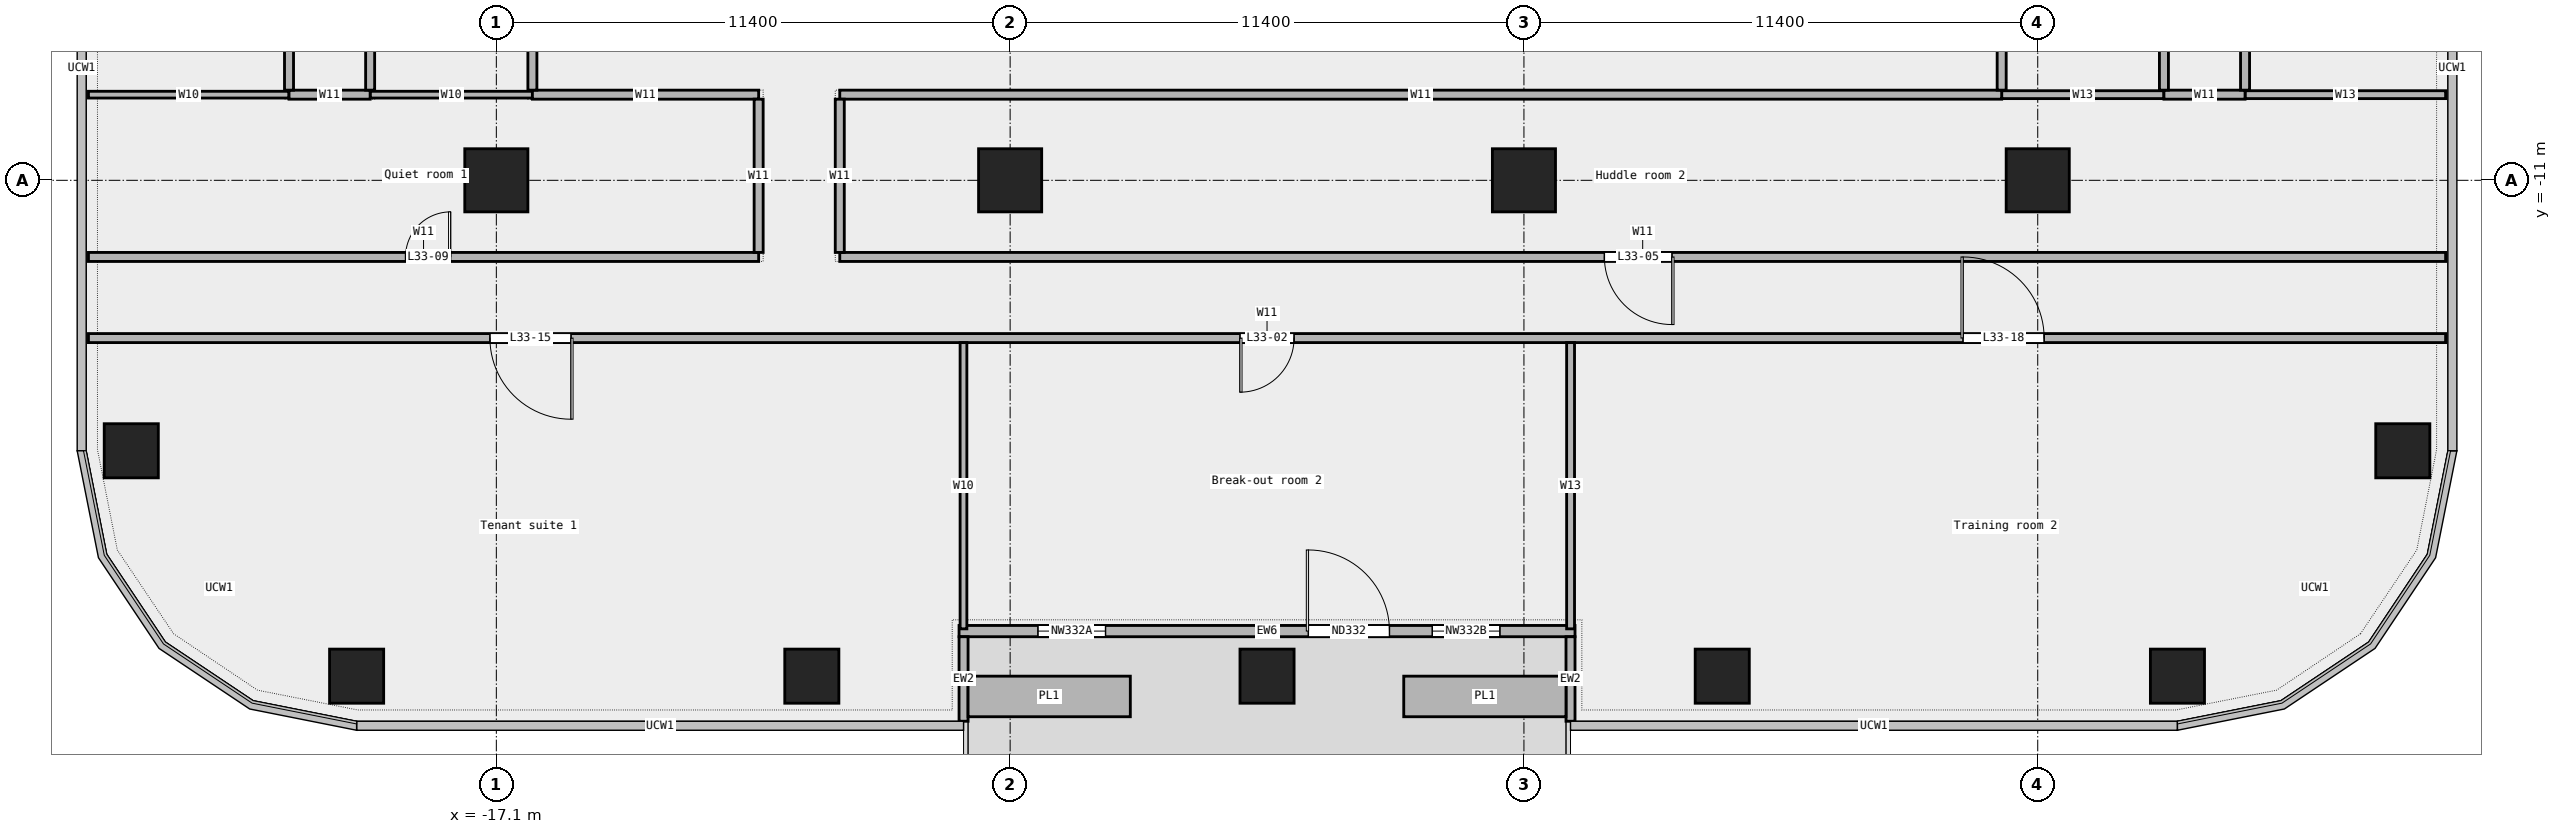
"""IFC4 building model, lengths in metres.
Left out: names, types, materials, properties, quantities, classifications, styles, units other than length and angle.
Written with IfcOpenShell. Run it as: python <this file> out.ifc"""

import sys

from ifc_helpers import new_model, si_unit, direction, frame, frame_2d, origin, origin_2d, place, context, subcontext, project, spatial, rectangle, extrude, element, fill, save


model = new_model("IFC4")
c1 = context("Model", 3, precision=1e-05, world=origin(), true_north=direction((0.0, 1.0)))
c2 = subcontext(c1, "Body", "Model", "MODEL_VIEW")
j1 = project(units=[si_unit("LENGTHUNIT", "METRE"), si_unit("PLANEANGLEUNIT", "RADIAN")], contexts=[c1])
p1 = place(None, origin())
s1 = spatial("IfcSite", under=j1, at=p1, CompositionType="ELEMENT")
p2 = place(p1, origin())
s2 = spatial("IfcBuilding", under=s1, at=p2, CompositionType="ELEMENT")
p3 = place(p2, frame((0.0, 0.0, 165.0)))
s3 = spatial("IfcBuildingStorey", under=s2, at=p3, CompositionType="ELEMENT", Elevation=165.0)
for number, where, z_axis, x_axis in (
    (1, (-20.2, -22.0, 0.0), (0.0, 0.0, 1.0), (1.0, 0.0, 0.0)),
    (2, (-10.1, -22.0, 0.0), (0.0, 0.0, 1.0), (1.0, 0.0, 0.0)),
    (3, (0.0, -22.0, 0.0), (0.0, 0.0, 1.0), (1.0, 0.0, 0.0)),
    (4, (10.1, -22.0, 0.0), (0.0, 0.0, 1.0), (1.0, 0.0, 0.0)),
    (5, (20.2, -22.0, 0.0), (0.0, 0.0, 1.0), (1.0, 0.0, 0.0)),
    (6, (25.2, -17.0, 0.0), (0.0, 0.0, 1.0), (1.0, 0.0, 0.0)),
    (7, (-25.2, -17.0, 0.0), (0.0, 0.0, 1.0), (1.0, 0.0, 0.0)),
):
    element("IfcColumn", number, at=place(p3, frame(where, z_axis=z_axis, x_axis=x_axis)), inside=s3, PredefinedType="COLUMN", context=c2, shape_type="SweptSolid", body=[
        extrude(rectangle(XDim=1.2, YDim=1.2, at=origin_2d()), origin(), (0.0, 0.0, 1.0), 3.6),
    ])
for number, where, z_axis, x_axis in (
    (8, (-17.1, -11.0, 0.0), (0.0, 0.0, 1.0), (1.0, 0.0, 0.0)),
    (9, (-5.7, -11.0, 0.0), (0.0, 0.0, 1.0), (1.0, 0.0, 0.0)),
    (10, (5.7, -11.0, 0.0), (0.0, 0.0, 1.0), (1.0, 0.0, 0.0)),
    (11, (17.1, -11.0, 0.0), (0.0, 0.0, 1.0), (1.0, 0.0, 0.0)),
):
    element("IfcColumn", number, at=place(p3, frame(where, z_axis=z_axis, x_axis=x_axis)), inside=s3, PredefinedType="COLUMN", context=c2, shape_type="SweptSolid", body=[
        extrude(rectangle(XDim=1.4, YDim=1.4, at=origin_2d()), origin(), (0.0, 0.0, 1.0), 3.6),
    ])
p4 = place(p3, frame((-6.833, -21.0, 0.0), z_axis=(0.0, 0.0, 1.0), x_axis=(1.0, 0.0, 0.0)))
e12 = element("IfcWall", 12, at=p4, inside=s3, PredefinedType="STANDARD", context=c2, shape_type="SweptSolid", body=[
    extrude(rectangle(XDim=13.667, YDim=0.25, at=frame_2d((6.833, 0.0))), origin(), (0.0, 0.0, 1.0), 3.6),
])
p5 = place(p4, frame((1.75, 0.0, 0.45)))
e13 = element("IfcOpeningElement", 13, at=p5, cuts=e12, PredefinedType="OPENING", context=c2, shape_type="SweptSolid", body=[
    extrude(rectangle(XDim=1.5, YDim=2.4, at=frame_2d((0.75, 1.2))), frame((0.0, 0.137, 0.0), z_axis=(0.0, -1.0, 0.0), x_axis=(1.0, 0.0, 0.0)), (0.0, 0.0, 1.0), 0.274),
])
p6 = place(p4, frame((7.75, 0.0, 0.0)))
e14 = element("IfcOpeningElement", 14, at=p6, cuts=e12, PredefinedType="OPENING", context=c2, shape_type="SweptSolid", body=[
    extrude(rectangle(XDim=1.8, YDim=2.4, at=frame_2d((0.9, 1.2))), frame((0.0, 0.137, 0.0), z_axis=(0.0, -1.0, 0.0), x_axis=(1.0, 0.0, 0.0)), (0.0, 0.0, 1.0), 0.274),
])
p7 = place(p4, frame((10.5, 0.0, 0.45)))
e15 = element("IfcOpeningElement", 15, at=p7, cuts=e12, PredefinedType="OPENING", context=c2, shape_type="SweptSolid", body=[
    extrude(rectangle(XDim=1.5, YDim=2.4, at=frame_2d((0.75, 1.2))), frame((0.0, 0.137, 0.0), z_axis=(0.0, -1.0, 0.0), x_axis=(1.0, 0.0, 0.0)), (0.0, 0.0, 1.0), 0.274),
])
for number, where, z_axis, x_axis in (
    (16, (-6.733, -23.0, 0.0), (0.0, 0.0, 1.0), (0.0, 1.0, 0.0)),
    (17, (6.733, -23.0, 0.0), (0.0, 0.0, 1.0), (0.0, 1.0, 0.0)),
):
    element("IfcWall", number, at=place(p3, frame(where, z_axis=z_axis, x_axis=x_axis)), inside=s3, PredefinedType="STANDARD", context=c2, shape_type="SweptSolid", body=[
        extrude(rectangle(XDim=1.875, YDim=0.2, at=frame_2d((0.938, 0.0))), origin(), (0.0, 0.0, 1.0), 3.6),
    ])
for number, where, z_axis, x_axis in (
    (18, (-6.633, -22.45, 0.0), (0.0, 0.0, 1.0), (1.0, 0.0, 0.0)),
    (19, (3.033, -22.45, 0.0), (0.0, 0.0, 1.0), (1.0, 0.0, 0.0)),
):
    element("IfcWall", number, at=place(p3, frame(where, z_axis=z_axis, x_axis=x_axis)), inside=s3, PredefinedType="STANDARD", context=c2, shape_type="SweptSolid", body=[
        extrude(rectangle(XDim=3.6, YDim=0.9, at=frame_2d((1.8, 0.0))), origin(), (0.0, 0.0, 1.0), 0.7),
    ])
p8 = place(p3, frame((-26.15, -14.5, 0.0), z_axis=(0.0, 0.0, 1.0), x_axis=(1.0, 0.0, 0.0)))
e20 = element("IfcWall", 20, at=p8, inside=s3, PredefinedType="PARTITIONING", context=c2, shape_type="SweptSolid", body=[
    extrude(rectangle(XDim=52.3, YDim=0.2, at=frame_2d((26.15, 0.0))), origin(), (0.0, 0.0, 1.0), 3.6),
])
p9 = place(p8, frame((25.55, 0.0, 0.0)))
e21 = element("IfcOpeningElement", 21, at=p9, cuts=e20, PredefinedType="OPENING", context=c2, shape_type="SweptSolid", body=[
    extrude(rectangle(XDim=1.2, YDim=2.1, at=frame_2d((0.6, 1.05))), frame((0.0, 0.112, 0.0), z_axis=(0.0, -1.0, 0.0), x_axis=(1.0, 0.0, 0.0)), (0.0, 0.0, 1.0), 0.224),
])
p10 = place(p8, frame((8.907, 0.0, 0.0)))
e22 = element("IfcOpeningElement", 22, at=p10, cuts=e20, PredefinedType="OPENING", context=c2, shape_type="SweptSolid", body=[
    extrude(rectangle(XDim=1.8, YDim=2.1, at=frame_2d((0.9, 1.05))), frame((0.0, 0.112, 0.0), z_axis=(0.0, -1.0, 0.0), x_axis=(1.0, 0.0, 0.0)), (0.0, 0.0, 1.0), 0.224),
])
p11 = place(p8, frame((41.593, 0.0, 0.0)))
e23 = element("IfcOpeningElement", 23, at=p11, cuts=e20, PredefinedType="OPENING", context=c2, shape_type="SweptSolid", body=[
    extrude(rectangle(XDim=1.8, YDim=2.1, at=frame_2d((0.9, 1.05))), frame((0.0, 0.112, 0.0), z_axis=(0.0, -1.0, 0.0), x_axis=(1.0, 0.0, 0.0)), (0.0, 0.0, 1.0), 0.224),
])
p12 = place(p3, frame((-26.15, -12.7, 0.0), z_axis=(0.0, 0.0, 1.0), x_axis=(1.0, 0.0, 0.0)))
e24 = element("IfcWall", 24, at=p12, inside=s3, PredefinedType="PARTITIONING", context=c2, shape_type="SweptSolid", body=[
    extrude(rectangle(XDim=14.87, YDim=0.2, at=frame_2d((7.435, 0.0))), origin(), (0.0, 0.0, 1.0), 3.6),
])
p13 = place(p12, frame((7.035, 0.0, 0.0)))
e25 = element("IfcOpeningElement", 25, at=p13, cuts=e24, PredefinedType="OPENING", context=c2, shape_type="SweptSolid", body=[
    extrude(rectangle(XDim=1.0, YDim=2.1, at=frame_2d((0.5, 1.05))), frame((0.0, 0.112, 0.0), z_axis=(0.0, -1.0, 0.0), x_axis=(1.0, 0.0, 0.0)), (0.0, 0.0, 1.0), 0.224),
])
p14 = place(p3, frame((-9.48, -12.7, 0.0), z_axis=(0.0, 0.0, 1.0), x_axis=(1.0, 0.0, 0.0)))
e26 = element("IfcWall", 26, at=p14, inside=s3, PredefinedType="PARTITIONING", context=c2, shape_type="SweptSolid", body=[
    extrude(rectangle(XDim=35.63, YDim=0.2, at=frame_2d((17.815, 0.0))), origin(), (0.0, 0.0, 1.0), 3.6),
])
p15 = place(p14, frame((16.965, 0.0, 0.0)))
e27 = element("IfcOpeningElement", 27, at=p15, cuts=e26, PredefinedType="OPENING", context=c2, shape_type="SweptSolid", body=[
    extrude(rectangle(XDim=1.5, YDim=2.1, at=frame_2d((0.75, 1.05))), frame((0.0, 0.112, 0.0), z_axis=(0.0, -1.0, 0.0), x_axis=(1.0, 0.0, 0.0)), (0.0, 0.0, 1.0), 0.224),
])
p16 = place(p3, frame((-26.15, -9.1, 0.0), z_axis=(0.0, 0.0, 1.0), x_axis=(1.0, 0.0, 0.0)))
e28 = element("IfcWall", 28, at=p16, inside=s3, PredefinedType="PARTITIONING", context=c2, shape_type="SweptSolid", body=[
    extrude(rectangle(XDim=4.45, YDim=0.15, at=frame_2d((2.225, 0.0))), origin(), (0.0, 0.0, 1.0), 3.6),
])
p17 = place(p3, frame((-19.9, -9.1, 0.0), z_axis=(0.0, 0.0, 1.0), x_axis=(1.0, 0.0, 0.0)))
e29 = element("IfcWall", 29, at=p17, inside=s3, PredefinedType="PARTITIONING", context=c2, shape_type="SweptSolid", body=[
    extrude(rectangle(XDim=3.6, YDim=0.15, at=frame_2d((1.8, 0.0))), origin(), (0.0, 0.0, 1.0), 3.6),
])
p18 = place(p3, frame((16.3, -9.1, 0.0), z_axis=(0.0, 0.0, 1.0), x_axis=(1.0, 0.0, 0.0)))
e30 = element("IfcWall", 30, at=p18, inside=s3, PredefinedType="PARTITIONING", context=c2, shape_type="SweptSolid", body=[
    extrude(rectangle(XDim=3.6, YDim=0.175, at=frame_2d((1.8, 0.0))), origin(), (0.0, 0.0, 1.0), 3.6),
])
p19 = place(p3, frame((21.7, -9.1, 0.0), z_axis=(0.0, 0.0, 1.0), x_axis=(1.0, 0.0, 0.0)))
e31 = element("IfcWall", 31, at=p19, inside=s3, PredefinedType="PARTITIONING", context=c2, shape_type="SweptSolid", body=[
    extrude(rectangle(XDim=4.45, YDim=0.175, at=frame_2d((2.225, 0.0))), origin(), (0.0, 0.0, 1.0), 3.6),
])
p20 = place(p3, frame((-21.7, -9.1, 0.0), z_axis=(0.0, 0.0, 1.0), x_axis=(1.0, 0.0, 0.0)))
e32 = element("IfcWall", 32, at=p20, inside=s3, PredefinedType="PARTITIONING", context=c2, shape_type="SweptSolid", body=[
    extrude(rectangle(XDim=1.8, YDim=0.2, at=frame_2d((0.9, 0.0))), origin(), (0.0, 0.0, 1.0), 3.6),
])
p21 = place(p3, frame((-16.3, -9.1, 0.0), z_axis=(0.0, 0.0, 1.0), x_axis=(1.0, 0.0, 0.0)))
e33 = element("IfcWall", 33, at=p21, inside=s3, PredefinedType="PARTITIONING", context=c2, shape_type="SweptSolid", body=[
    extrude(rectangle(XDim=5.02, YDim=0.2, at=frame_2d((2.51, 0.0))), origin(), (0.0, 0.0, 1.0), 3.6),
])
p22 = place(p3, frame((-9.48, -9.1, 0.0), z_axis=(0.0, 0.0, 1.0), x_axis=(1.0, 0.0, 0.0)))
e34 = element("IfcWall", 34, at=p22, inside=s3, PredefinedType="PARTITIONING", context=c2, shape_type="SweptSolid", body=[
    extrude(rectangle(XDim=25.78, YDim=0.2, at=frame_2d((12.89, 0.0))), origin(), (0.0, 0.0, 1.0), 3.6),
])
p23 = place(p3, frame((19.9, -9.1, 0.0), z_axis=(0.0, 0.0, 1.0), x_axis=(1.0, 0.0, 0.0)))
e35 = element("IfcWall", 35, at=p23, inside=s3, PredefinedType="PARTITIONING", context=c2, shape_type="SweptSolid", body=[
    extrude(rectangle(XDim=1.8, YDim=0.2, at=frame_2d((0.9, 0.0))), origin(), (0.0, 0.0, 1.0), 3.6),
])
p24 = place(p3, frame((-21.7, -9.0, 0.0), z_axis=(0.0, 0.0, 1.0), x_axis=(0.0, 1.0, 0.0)))
e36 = element("IfcWall", 36, at=p24, inside=s3, PredefinedType="PARTITIONING", context=c2, shape_type="SweptSolid", body=[
    extrude(rectangle(XDim=24.3, YDim=0.2, at=frame_2d((12.15, 0.0))), origin(), (0.0, 0.0, 1.0), 3.6),
])
p25 = place(p24, frame((14.925, 0.0, 0.0)))
e37 = element("IfcOpeningElement", 37, at=p25, cuts=e36, PredefinedType="OPENING", context=c2, shape_type="SweptSolid", body=[
    extrude(rectangle(XDim=0.9, YDim=2.1, at=frame_2d((0.45, 1.05))), frame((0.0, 0.112, 0.0), z_axis=(0.0, -1.0, 0.0), x_axis=(1.0, 0.0, 0.0)), (0.0, 0.0, 1.0), 0.224),
])
p26 = place(p24, frame((4.05, 0.0, 0.0)))
e38 = element("IfcOpeningElement", 38, at=p26, cuts=e36, PredefinedType="OPENING", context=c2, shape_type="SweptSolid", body=[
    extrude(rectangle(XDim=0.9, YDim=2.1, at=frame_2d((0.45, 1.05))), frame((0.0, 0.112, 0.0), z_axis=(0.0, -1.0, 0.0), x_axis=(1.0, 0.0, 0.0)), (0.0, 0.0, 1.0), 0.224),
])
p27 = place(p3, frame((-19.9, -9.0, 0.0), z_axis=(0.0, 0.0, 1.0), x_axis=(0.0, 1.0, 0.0)))
e39 = element("IfcWall", 39, at=p27, inside=s3, PredefinedType="PARTITIONING", context=c2, shape_type="SweptSolid", body=[
    extrude(rectangle(XDim=11.15, YDim=0.2, at=frame_2d((5.575, 0.0))), origin(), (0.0, 0.0, 1.0), 3.6),
])
p28 = place(p3, frame((-16.3, -9.0, 0.0), z_axis=(0.0, 0.0, 1.0), x_axis=(0.0, 1.0, 0.0)))
e40 = element("IfcWall", 40, at=p28, inside=s3, PredefinedType="PARTITIONING", context=c2, shape_type="SweptSolid", body=[
    extrude(rectangle(XDim=8.3, YDim=0.2, at=frame_2d((4.15, 0.0))), origin(), (0.0, 0.0, 1.0), 3.6),
])
p29 = place(p28, frame((6.823, 0.0, 0.0)))
e41 = element("IfcOpeningElement", 41, at=p29, cuts=e40, PredefinedType="OPENING", context=c2, shape_type="SweptSolid", body=[
    extrude(rectangle(XDim=0.9, YDim=2.1, at=frame_2d((0.45, 1.05))), frame((0.0, 0.112, 0.0), z_axis=(0.0, -1.0, 0.0), x_axis=(1.0, 0.0, 0.0)), (0.0, 0.0, 1.0), 0.224),
])
p30 = place(p28, frame((2.673, 0.0, 0.0)))
e42 = element("IfcOpeningElement", 42, at=p30, cuts=e40, PredefinedType="OPENING", context=c2, shape_type="SweptSolid", body=[
    extrude(rectangle(XDim=0.9, YDim=2.1, at=frame_2d((0.45, 1.05))), frame((0.0, 0.112, 0.0), z_axis=(0.0, -1.0, 0.0), x_axis=(1.0, 0.0, 0.0)), (0.0, 0.0, 1.0), 0.224),
])
for number, where, z_axis, x_axis in (
    (43, (-11.28, -12.6, 0.0), (0.0, 0.0, 1.0), (0.0, 1.0, 0.0)),
    (44, (-9.48, -12.6, 0.0), (0.0, 0.0, 1.0), (0.0, 1.0, 0.0)),
):
    element("IfcWall", number, at=place(p3, frame(where, z_axis=z_axis, x_axis=x_axis)), inside=s3, PredefinedType="PARTITIONING", context=c2, shape_type="SweptSolid", body=[
        extrude(rectangle(XDim=3.4, YDim=0.2, at=frame_2d((1.7, 0.0))), origin(), (0.0, 0.0, 1.0), 3.6),
    ])
p31 = place(p3, frame((-6.735, -20.95, 0.0), z_axis=(0.0, 0.0, 1.0), x_axis=(0.0, 1.0, 0.0)))
e45 = element("IfcWall", 45, at=p31, inside=s3, PredefinedType="PARTITIONING", context=c2, shape_type="SweptSolid", body=[
    extrude(rectangle(XDim=6.35, YDim=0.15, at=frame_2d((3.175, 0.0))), origin(), (0.0, 0.0, 1.0), 3.6),
])
p32 = place(p3, frame((6.735, -20.95, 0.0), z_axis=(0.0, 0.0, 1.0), x_axis=(0.0, 1.0, 0.0)))
e46 = element("IfcWall", 46, at=p32, inside=s3, PredefinedType="PARTITIONING", context=c2, shape_type="SweptSolid", body=[
    extrude(rectangle(XDim=6.35, YDim=0.175, at=frame_2d((3.175, 0.0))), origin(), (0.0, 0.0, 1.0), 3.6),
])
p33 = place(p3, frame((16.3, -9.0, 0.0), z_axis=(0.0, 0.0, 1.0), x_axis=(0.0, 1.0, 0.0)))
e47 = element("IfcWall", 47, at=p33, inside=s3, PredefinedType="PARTITIONING", context=c2, shape_type="SweptSolid", body=[
    extrude(rectangle(XDim=8.3, YDim=0.2, at=frame_2d((4.15, 0.0))), origin(), (0.0, 0.0, 1.0), 3.6),
])
p34 = place(p3, frame((19.9, -9.0, 0.0), z_axis=(0.0, 0.0, 1.0), x_axis=(0.0, 1.0, 0.0)))
e48 = element("IfcWall", 48, at=p34, inside=s3, PredefinedType="PARTITIONING", context=c2, shape_type="SweptSolid", body=[
    extrude(rectangle(XDim=13.6, YDim=0.2, at=frame_2d((6.8, 0.0))), origin(), (0.0, 0.0, 1.0), 3.6),
])
p35 = place(p34, frame((3.442, 0.0, 0.0)))
e49 = element("IfcOpeningElement", 49, at=p35, cuts=e48, PredefinedType="OPENING", context=c2, shape_type="SweptSolid", body=[
    extrude(rectangle(XDim=0.9, YDim=2.1, at=frame_2d((0.45, 1.05))), frame((0.0, 0.112, 0.0), z_axis=(0.0, -1.0, 0.0), x_axis=(1.0, 0.0, 0.0)), (0.0, 0.0, 1.0), 0.224),
])
p36 = place(p34, frame((10.242, 0.0, 0.0)))
e50 = element("IfcOpeningElement", 50, at=p36, cuts=e48, PredefinedType="OPENING", context=c2, shape_type="SweptSolid", body=[
    extrude(rectangle(XDim=0.9, YDim=2.1, at=frame_2d((0.45, 1.05))), frame((0.0, 0.112, 0.0), z_axis=(0.0, -1.0, 0.0), x_axis=(1.0, 0.0, 0.0)), (0.0, 0.0, 1.0), 0.224),
])
p37 = place(p3, frame((21.7, -9.0, 0.0), z_axis=(0.0, 0.0, 1.0), x_axis=(0.0, 1.0, 0.0)))
e51 = element("IfcWall", 51, at=p37, inside=s3, PredefinedType="PARTITIONING", context=c2, shape_type="SweptSolid", body=[
    extrude(rectangle(XDim=24.3, YDim=0.2, at=frame_2d((12.15, 0.0))), origin(), (0.0, 0.0, 1.0), 3.6),
])
p38 = place(p37, frame((14.925, 0.0, 0.0)))
e52 = element("IfcOpeningElement", 52, at=p38, cuts=e51, PredefinedType="OPENING", context=c2, shape_type="SweptSolid", body=[
    extrude(rectangle(XDim=0.9, YDim=2.1, at=frame_2d((0.45, 1.05))), frame((0.0, 0.112, 0.0), z_axis=(0.0, -1.0, 0.0), x_axis=(1.0, 0.0, 0.0)), (0.0, 0.0, 1.0), 0.224),
])
p39 = place(p37, frame((2.562, 0.0, 0.0)))
e53 = element("IfcOpeningElement", 53, at=p39, cuts=e51, PredefinedType="OPENING", context=c2, shape_type="SweptSolid", body=[
    extrude(rectangle(XDim=0.9, YDim=2.1, at=frame_2d((0.45, 1.05))), frame((0.0, 0.112, 0.0), z_axis=(0.0, -1.0, 0.0), x_axis=(1.0, 0.0, 0.0)), (0.0, 0.0, 1.0), 0.224),
])
p40 = place(p5, origin())
e54 = element("IfcWindow", 54, at=p40, inside=s3, PartitioningType="SINGLE_PANEL", PredefinedType="WINDOW", context=c2, shape_type="SweptSolid", body=[
    extrude(rectangle(XDim=1.5, YDim=2.4, at=frame_2d((0.75, 1.2))), frame((0.0, 0.03, 0.0), z_axis=(0.0, -1.0, 0.0), x_axis=(1.0, 0.0, 0.0)), (0.0, 0.0, 1.0), 0.06),
])
fill(e13, e54)
p41 = place(p6, origin())
e55 = element("IfcDoor", 55, at=p41, inside=s3, OperationType="DOUBLE_DOOR_SINGLE_SWING", PredefinedType="DOOR", context=c2, shape_type="SweptSolid", body=[
    extrude(rectangle(XDim=1.8, YDim=2.4, at=frame_2d((0.9, 1.2))), frame((0.0, 0.025, 0.0), z_axis=(0.0, -1.0, 0.0), x_axis=(1.0, 0.0, 0.0)), (0.0, 0.0, 1.0), 0.05),
])
fill(e14, e55)
p42 = place(p7, origin())
e56 = element("IfcWindow", 56, at=p42, inside=s3, PartitioningType="SINGLE_PANEL", PredefinedType="WINDOW", context=c2, shape_type="SweptSolid", body=[
    extrude(rectangle(XDim=1.5, YDim=2.4, at=frame_2d((0.75, 1.2))), frame((0.0, 0.03, 0.0), z_axis=(0.0, -1.0, 0.0), x_axis=(1.0, 0.0, 0.0)), (0.0, 0.0, 1.0), 0.06),
])
fill(e15, e56)
p43 = place(p9, origin())
e57 = element("IfcDoor", 57, at=p43, inside=s3, OperationType="SINGLE_SWING_RIGHT", PredefinedType="DOOR", context=c2, shape_type="SweptSolid", body=[
    extrude(rectangle(XDim=1.2, YDim=2.1, at=frame_2d((0.6, 1.05))), frame((0.0, 0.025, 0.0), z_axis=(0.0, -1.0, 0.0), x_axis=(1.0, 0.0, 0.0)), (0.0, 0.0, 1.0), 0.05),
])
fill(e21, e57)
p44 = place(p15, origin())
e58 = element("IfcDoor", 58, at=p44, inside=s3, OperationType="DOUBLE_DOOR_SINGLE_SWING", PredefinedType="DOOR", context=c2, shape_type="SweptSolid", body=[
    extrude(rectangle(XDim=1.5, YDim=2.1, at=frame_2d((0.75, 1.05))), frame((0.0, 0.025, 0.0), z_axis=(0.0, -1.0, 0.0), x_axis=(1.0, 0.0, 0.0)), (0.0, 0.0, 1.0), 0.05),
])
fill(e27, e58)
p45 = place(p13, origin())
e59 = element("IfcDoor", 59, at=p45, inside=s3, OperationType="SINGLE_SWING_RIGHT", PredefinedType="DOOR", context=c2, shape_type="SweptSolid", body=[
    extrude(rectangle(XDim=1.0, YDim=2.1, at=frame_2d((0.5, 1.05))), frame((0.0, 0.025, 0.0), z_axis=(0.0, -1.0, 0.0), x_axis=(1.0, 0.0, 0.0)), (0.0, 0.0, 1.0), 0.05),
])
fill(e25, e59)
p46 = place(p10, origin())
e60 = element("IfcDoor", 60, at=p46, inside=s3, OperationType="DOUBLE_DOOR_SINGLE_SWING", PredefinedType="DOOR", context=c2, shape_type="SweptSolid", body=[
    extrude(rectangle(XDim=1.8, YDim=2.1, at=frame_2d((0.9, 1.05))), frame((0.0, 0.025, 0.0), z_axis=(0.0, -1.0, 0.0), x_axis=(1.0, 0.0, 0.0)), (0.0, 0.0, 1.0), 0.05),
])
fill(e22, e60)
p47 = place(p11, origin())
e61 = element("IfcDoor", 61, at=p47, inside=s3, OperationType="DOUBLE_DOOR_SINGLE_SWING", PredefinedType="DOOR", context=c2, shape_type="SweptSolid", body=[
    extrude(rectangle(XDim=1.8, YDim=2.1, at=frame_2d((0.9, 1.05))), frame((0.0, 0.025, 0.0), z_axis=(0.0, -1.0, 0.0), x_axis=(1.0, 0.0, 0.0)), (0.0, 0.0, 1.0), 0.05),
])
fill(e23, e61)
save(model, sys.argv[1])
